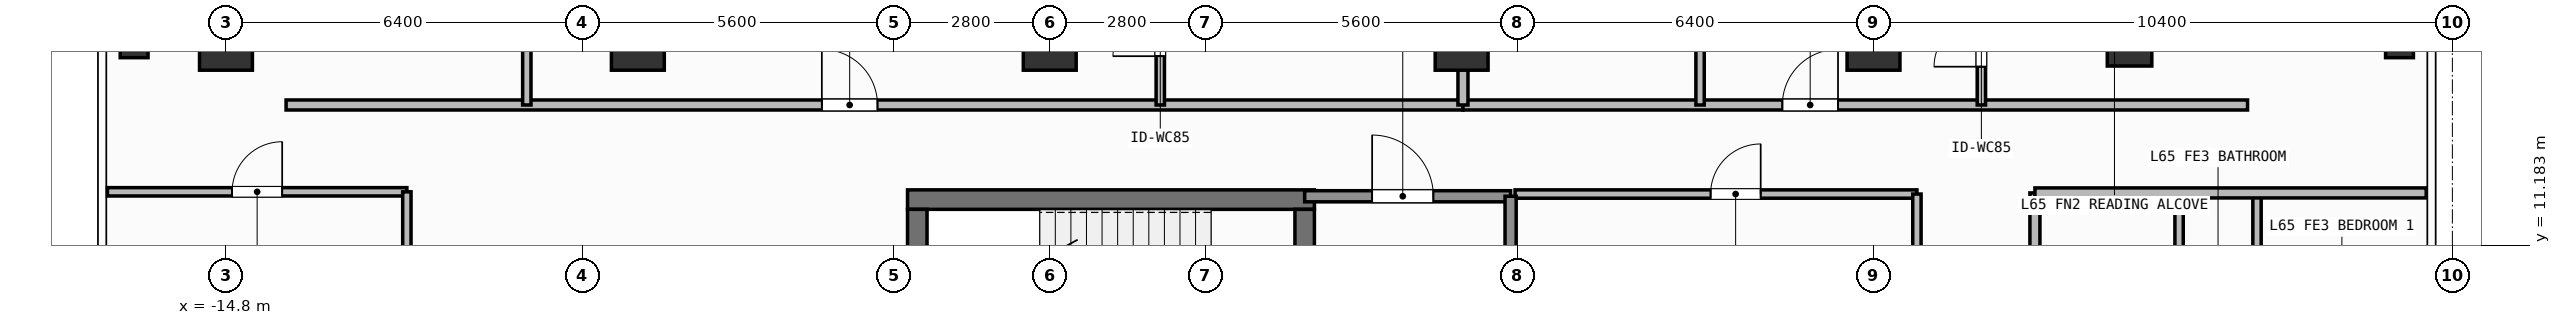
"""IFC4 building model, lengths in metres.
Left out: names, types, materials, properties, quantities, classifications, styles, units other than length and angle.
Written with IfcOpenShell. Run it as: python <this file> out.ifc"""

import sys

from ifc_helpers import new_model, si_unit, direction, frame, frame_2d, origin, origin_2d, place, context, subcontext, project, spatial, rectangle, hollow_rectangle, extrude, element, fill, save


model = new_model("IFC4")
c1 = context("Model", 3, precision=1e-05, world=origin(), true_north=direction((0.0, 1.0)))
c2 = subcontext(c1, "Body", "Model", "MODEL_VIEW")
j1 = project(units=[si_unit("LENGTHUNIT", "METRE"), si_unit("PLANEANGLEUNIT", "RADIAN")], contexts=[c1])
p1 = place(None, origin())
s1 = spatial("IfcSite", under=j1, at=p1, CompositionType="ELEMENT")
p2 = place(p1, origin())
s2 = spatial("IfcBuilding", under=s1, at=p2, CompositionType="ELEMENT")
p3 = place(p2, frame((0.0, 0.0, 266.4)))
s3 = spatial("IfcBuildingStorey", under=s2, at=p3, CompositionType="ELEMENT", Elevation=266.4)
p4 = place(p3, frame((-2.555, 12.0, 0.0), z_axis=(0.0, 0.0, 1.0), x_axis=(1.0, 0.0, 0.0)))
e1 = element("IfcWall", 1, at=p4, inside=s3, PredefinedType="SHEAR", context=c2, shape_type="SweptSolid", body=[
    extrude(rectangle(XDim=7.31, YDim=0.35, at=frame_2d((3.655, 0.0))), origin(), (0.0, 0.0, 1.0), 3.9),
])
p5 = place(p3, frame((-2.38, 8.9, 0.0), z_axis=(0.0, 0.0, 1.0), x_axis=(0.0, 1.0, 0.0)))
e2 = element("IfcWall", 2, at=p5, inside=s3, PredefinedType="SHEAR", context=c2, shape_type="SweptSolid", body=[
    extrude(rectangle(XDim=2.925, YDim=0.35, at=frame_2d((1.462, 0.0))), origin(), (0.0, 0.0, 1.0), 3.9),
])
p6 = place(p3, frame((4.58, 11.825, 0.0), z_axis=(0.0, 0.0, 1.0), x_axis=(0.0, -1.0, 0.0)))
e3 = element("IfcWall", 3, at=p6, inside=s3, PredefinedType="SHEAR", context=c2, shape_type="SweptSolid", body=[
    extrude(rectangle(XDim=2.925, YDim=0.35, at=frame_2d((1.462, 0.0))), origin(), (0.0, 0.0, 1.0), 3.9),
])
p7 = place(p6, frame((0.913, 0.0, 0.0)))
e4 = element("IfcOpeningElement", 4, at=p7, cuts=e3, PredefinedType="OPENING", context=c2, shape_type="SweptSolid", body=[
    extrude(rectangle(XDim=1.1, YDim=2.15, at=frame_2d((0.55, 1.075))), frame((0.0, 0.185, 0.0), z_axis=(0.0, -1.0, 0.0), x_axis=(1.0, 0.0, 0.0)), (0.0, 0.0, 1.0), 0.37),
])
for number, where, z_axis, x_axis in (
    (5, (-14.8, 14.8, 0.0), (0.0, 0.0, 1.0), (1.0, 0.0, 0.0)),
    (6, (-7.4, 14.8, 0.0), (0.0, 0.0, 1.0), (1.0, 0.0, 0.0)),
    (7, (0.0, 14.8, 0.0), (0.0, 0.0, 1.0), (1.0, 0.0, 0.0)),
    (8, (7.4, 14.8, 0.0), (0.0, 0.0, 1.0), (1.0, 0.0, 0.0)),
    (9, (14.8, 14.8, 0.0), (0.0, 0.0, 1.0), (1.0, 0.0, 0.0)),
):
    element("IfcColumn", number, at=place(p3, frame(where, z_axis=z_axis, x_axis=x_axis)), inside=s3, PredefinedType="COLUMN", context=c2, shape_type="SweptSolid", body=[
        extrude(rectangle(XDim=0.95, YDim=0.95, at=origin_2d()), origin(), (0.0, 0.0, 1.0), 3.9),
    ])
p8 = place(p3, frame((19.4, 14.8, 0.0), z_axis=(0.0, 0.0, 1.0), x_axis=(1.0, 0.0, 0.0)))
e10 = element("IfcColumn", 10, at=p8, inside=s3, PredefinedType="COLUMN", context=c2, shape_type="SweptSolid", body=[
    extrude(hollow_rectangle(XDim=0.8, YDim=0.8, WallThickness=0.036, at=origin_2d()), origin(), (0.0, 0.0, 1.0), 3.9),
])
for number, where, z_axis, x_axis in (
    (11, (-16.45, 14.8, 0.0), (0.0, 0.0, 1.0), (1.0, 0.0, 0.0)),
    (12, (24.25, 14.8, 0.0), (0.0, 0.0, 1.0), (1.0, 0.0, 0.0)),
):
    element("IfcColumn", number, at=place(p3, frame(where, z_axis=z_axis, x_axis=x_axis)), inside=s3, PredefinedType="COLUMN", context=c2, shape_type="SweptSolid", body=[
        extrude(hollow_rectangle(XDim=0.5, YDim=0.5, WallThickness=0.025, at=origin_2d()), origin(), (0.0, 0.0, 1.0), 3.9),
    ])
p9 = place(p3, frame((4.58, 12.06, 0.0), z_axis=(0.0, 0.0, 1.0), x_axis=(1.0, 0.0, 0.0)))
e13 = element("IfcWall", 13, at=p9, inside=s3, PredefinedType="SOLIDWALL", context=c2, shape_type="SweptSolid", body=[
    extrude(rectangle(XDim=3.7, YDim=0.2, at=frame_2d((1.85, 0.0))), origin(), (0.0, 0.0, 1.0), 3.68),
])
p10 = place(p9, frame((1.212, 0.0, 0.0)))
e14 = element("IfcOpeningElement", 14, at=p10, cuts=e13, PredefinedType="OPENING", context=c2, shape_type="SweptSolid", body=[
    extrude(rectangle(XDim=1.1, YDim=2.15, at=frame_2d((0.55, 1.075))), frame((0.0, 0.11, 0.0), z_axis=(0.0, -1.0, 0.0), x_axis=(1.0, 0.0, 0.0)), (0.0, 0.0, 1.0), 0.22),
])
p11 = place(p3, frame((8.36, 12.1, 0.0), z_axis=(0.0, 0.0, 1.0), x_axis=(1.0, 0.0, 0.0)))
e15 = element("IfcWall", 15, at=p11, inside=s3, PredefinedType="PARTITIONING", context=c2, shape_type="SweptSolid", body=[
    extrude(rectangle(XDim=7.22, YDim=0.15, at=frame_2d((3.61, 0.0))), origin(), (0.0, 0.0, 1.0), 3.68),
])
p12 = place(p11, frame((3.513, 0.0, 0.0)))
e16 = element("IfcOpeningElement", 16, at=p12, cuts=e15, PredefinedType="OPENING", context=c2, shape_type="SweptSolid", body=[
    extrude(rectangle(XDim=0.9, YDim=2.1, at=frame_2d((0.45, 1.05))), frame((0.0, 0.085, 0.0), z_axis=(0.0, -1.0, 0.0), x_axis=(1.0, 0.0, 0.0)), (0.0, 0.0, 1.0), 0.17),
])
p13 = place(p3, frame((-13.72, 13.7, 0.0), z_axis=(0.0, 0.0, 1.0), x_axis=(1.0, 0.0, 0.0)))
e17 = element("IfcWall", 17, at=p13, inside=s3, PredefinedType="PARTITIONING", context=c2, shape_type="SweptSolid", body=[
    extrude(rectangle(XDim=21.144, YDim=0.18, at=frame_2d((10.572, 0.0))), origin(), (0.0, 0.0, 1.0), 3.68),
])
p14 = place(p13, frame((9.625, 0.0, 0.0)))
e18 = element("IfcOpeningElement", 18, at=p14, cuts=e17, PredefinedType="OPENING", context=c2, shape_type="SweptSolid", body=[
    extrude(rectangle(XDim=1.0, YDim=2.2, at=frame_2d((0.5, 1.1))), frame((0.0, 0.1, 0.0), z_axis=(0.0, -1.0, 0.0), x_axis=(1.0, 0.0, 0.0)), (0.0, 0.0, 1.0), 0.2),
])
p15 = place(p3, frame((-9.395, 13.7, 0.0), z_axis=(0.0, 0.0, 1.0), x_axis=(0.0, 1.0, 0.0)))
e19 = element("IfcWall", 19, at=p15, inside=s3, PredefinedType="PARTITIONING", context=c2, shape_type="SweptSolid", body=[
    extrude(rectangle(XDim=4.213, YDim=0.15, at=frame_2d((2.106, 0.0))), origin(), (0.0, 0.0, 1.0), 3.68),
])
p16 = place(p15, frame((1.592, 0.0, 0.0)))
e20 = element("IfcOpeningElement", 20, at=p16, cuts=e19, PredefinedType="OPENING", context=c2, shape_type="SweptSolid", body=[
    extrude(rectangle(XDim=0.85, YDim=2.1, at=frame_2d((0.425, 1.05))), frame((0.0, 0.085, 0.0), z_axis=(0.0, -1.0, 0.0), x_axis=(1.0, 0.0, 0.0)), (0.0, 0.0, 1.0), 0.17),
])
p17 = place(p3, frame((1.986, 13.7, 0.0), z_axis=(0.0, 0.0, 1.0), x_axis=(0.0, 1.0, 0.0)))
e21 = element("IfcWall", 21, at=p17, inside=s3, PredefinedType="PARTITIONING", context=c2, shape_type="SweptSolid", body=[
    extrude(rectangle(XDim=2.604, YDim=0.15, at=frame_2d((1.302, 0.0))), origin(), (0.0, 0.0, 1.0), 3.68),
])
p18 = place(p17, frame((0.877, 0.0, 0.0)))
e22 = element("IfcOpeningElement", 22, at=p18, cuts=e21, PredefinedType="OPENING", context=c2, shape_type="SweptSolid", body=[
    extrude(rectangle(XDim=0.85, YDim=2.1, at=frame_2d((0.425, 1.05))), frame((0.0, 0.085, 0.0), z_axis=(0.0, -1.0, 0.0), x_axis=(1.0, 0.0, 0.0)), (0.0, 0.0, 1.0), 0.17),
])
p19 = place(p3, frame((7.424, 13.7, 0.0), z_axis=(0.0, 0.0, 1.0), x_axis=(1.0, 0.0, 0.0)))
e23 = element("IfcWall", 23, at=p19, inside=s3, PredefinedType="PARTITIONING", context=c2, shape_type="SweptSolid", body=[
    extrude(rectangle(XDim=14.096, YDim=0.18, at=frame_2d((7.048, 0.0))), origin(), (0.0, 0.0, 1.0), 3.68),
])
p20 = place(p19, frame((5.738, 0.0, 0.0)))
e24 = element("IfcOpeningElement", 24, at=p20, cuts=e23, PredefinedType="OPENING", context=c2, shape_type="SweptSolid", body=[
    extrude(rectangle(XDim=1.0, YDim=2.2, at=frame_2d((0.5, 1.1))), frame((0.0, 0.1, 0.0), z_axis=(0.0, -1.0, 0.0), x_axis=(1.0, 0.0, 0.0)), (0.0, 0.0, 1.0), 0.2),
])
p21 = place(p3, frame((11.684, 13.7, 0.0), z_axis=(0.0, 0.0, 1.0), x_axis=(0.0, 1.0, 0.0)))
e25 = element("IfcWall", 25, at=p21, inside=s3, PredefinedType="PARTITIONING", context=c2, shape_type="SweptSolid", body=[
    extrude(rectangle(XDim=4.29, YDim=0.15, at=frame_2d((2.145, 0.0))), origin(), (0.0, 0.0, 1.0), 3.68),
])
p22 = place(p21, frame((1.72, 0.0, 0.0)))
e26 = element("IfcOpeningElement", 26, at=p22, cuts=e25, PredefinedType="OPENING", context=c2, shape_type="SweptSolid", body=[
    extrude(rectangle(XDim=0.85, YDim=2.1, at=frame_2d((0.425, 1.05))), frame((0.0, 0.085, 0.0), z_axis=(0.0, -1.0, 0.0), x_axis=(1.0, 0.0, 0.0)), (0.0, 0.0, 1.0), 0.17),
])
p23 = place(p3, frame((16.738, 13.7, 0.0), z_axis=(0.0, 0.0, 1.0), x_axis=(0.0, 1.0, 0.0)))
e27 = element("IfcWall", 27, at=p23, inside=s3, PredefinedType="PARTITIONING", context=c2, shape_type="SweptSolid", body=[
    extrude(rectangle(XDim=2.402, YDim=0.15, at=frame_2d((1.201, 0.0))), origin(), (0.0, 0.0, 1.0), 3.68),
])
p24 = place(p23, frame((0.688, 0.0, 0.0)))
e28 = element("IfcOpeningElement", 28, at=p24, cuts=e27, PredefinedType="OPENING", context=c2, shape_type="SweptSolid", body=[
    extrude(rectangle(XDim=0.85, YDim=2.1, at=frame_2d((0.425, 1.05))), frame((0.0, 0.085, 0.0), z_axis=(0.0, -1.0, 0.0), x_axis=(1.0, 0.0, 0.0)), (0.0, 0.0, 1.0), 0.17),
])
p25 = place(p3, frame((-16.93, 12.14, 0.0), z_axis=(0.0, 0.0, 1.0), x_axis=(1.0, 0.0, 0.0)))
e29 = element("IfcWall", 29, at=p25, inside=s3, PredefinedType="PARTITIONING", context=c2, shape_type="SweptSolid", body=[
    extrude(rectangle(XDim=5.38, YDim=0.15, at=frame_2d((2.69, 0.0))), origin(), (0.0, 0.0, 1.0), 3.68),
])
p26 = place(p25, frame((2.24, 0.0, 0.0)))
e30 = element("IfcOpeningElement", 30, at=p26, cuts=e29, PredefinedType="OPENING", context=c2, shape_type="SweptSolid", body=[
    extrude(rectangle(XDim=0.9, YDim=2.1, at=frame_2d((0.45, 1.05))), frame((0.0, 0.085, 0.0), z_axis=(0.0, -1.0, 0.0), x_axis=(1.0, 0.0, 0.0)), (0.0, 0.0, 1.0), 0.17),
])
p27 = place(p3, frame((17.7, 4.04, 0.0), z_axis=(0.0, 0.0, 1.0), x_axis=(0.0, 1.0, 0.0)))
e31 = element("IfcWall", 31, at=p27, inside=s3, PredefinedType="PARTITIONING", context=c2, shape_type="SweptSolid", body=[
    extrude(rectangle(XDim=8.08, YDim=0.18, at=frame_2d((4.04, 0.0))), origin(), (0.0, 0.0, 1.0), 3.68),
])
p28 = place(p27, frame((1.761, 0.0, 0.0)))
e32 = element("IfcOpeningElement", 32, at=p28, cuts=e31, PredefinedType="OPENING", context=c2, shape_type="SweptSolid", body=[
    extrude(rectangle(XDim=1.0, YDim=2.2, at=frame_2d((0.5, 1.1))), frame((0.0, 0.1, 0.0), z_axis=(0.0, -1.0, 0.0), x_axis=(1.0, 0.0, 0.0)), (0.0, 0.0, 1.0), 0.2),
])
p29 = place(p3, frame((8.28, 8.725, 0.0), z_axis=(0.0, 0.0, 1.0), x_axis=(0.0, 1.0, 0.0)))
e33 = element("IfcWall", 33, at=p29, inside=s3, PredefinedType="SOLIDWALL", context=c2, shape_type="SweptSolid", body=[
    extrude(rectangle(XDim=3.335, YDim=0.2, at=frame_2d((1.667, 0.0))), origin(), (0.0, 0.0, 1.0), 3.68),
])
p30 = place(p3, frame((15.58, 5.85, 0.0), z_axis=(0.0, 0.0, 1.0), x_axis=(0.0, 1.0, 0.0)))
e34 = element("IfcWall", 34, at=p30, inside=s3, PredefinedType="PARTITIONING", context=c2, shape_type="SweptSolid", body=[
    extrude(rectangle(XDim=6.25, YDim=0.15, at=frame_2d((3.125, 0.0))), origin(), (0.0, 0.0, 1.0), 3.68),
])
p31 = place(p3, frame((7.424, 13.7, 0.0), z_axis=(0.0, 0.0, 1.0), x_axis=(0.0, 1.0, 0.0)))
e35 = element("IfcWall", 35, at=p31, inside=s3, PredefinedType="PARTITIONING", context=c2, shape_type="SweptSolid", body=[
    extrude(rectangle(XDim=7.33, YDim=0.18, at=frame_2d((3.665, 0.0))), origin(), (0.0, 0.0, 1.0), 3.182),
])
p32 = place(p3, frame((-11.55, 2.95, 0.0), z_axis=(0.0, 0.0, 1.0), x_axis=(0.0, 1.0, 0.0)))
e36 = element("IfcWall", 36, at=p32, inside=s3, PredefinedType="PARTITIONING", context=c2, shape_type="SweptSolid", body=[
    extrude(rectangle(XDim=9.19, YDim=0.15, at=frame_2d((4.595, 0.0))), origin(), (0.0, 0.0, 1.0), 3.68),
])
for number, where, z_axis, x_axis in (
    (37, (20.29, 8.505, 0.0), (0.0, 0.0, 1.0), (0.0, 1.0, 0.0)),
    (38, (21.69, 8.505, 0.0), (0.0, 0.0, 1.0), (0.0, 1.0, 0.0)),
):
    element("IfcWall", number, at=place(p3, frame(where, z_axis=z_axis, x_axis=x_axis)), inside=s3, PredefinedType="PARTITIONING", context=c2, shape_type="SweptSolid", body=[
        extrude(rectangle(XDim=3.615, YDim=0.15, at=frame_2d((1.808, 0.0))), origin(), (0.0, 0.0, 1.0), 3.68),
    ])
p33 = place(p3, frame((17.7, 12.12, 0.0), z_axis=(0.0, 0.0, 1.0), x_axis=(1.0, 0.0, 0.0)))
e39 = element("IfcWall", 39, at=p33, inside=s3, PredefinedType="PARTITIONING", context=c2, shape_type="SweptSolid", body=[
    extrude(rectangle(XDim=7.03, YDim=0.18, at=frame_2d((3.515, 0.0))), origin(), (0.0, 0.0, 1.0), 3.68),
])
p34 = place(p10, origin())
e40 = element("IfcDoor", 40, at=p34, inside=s3, OperationType="SINGLE_SWING_LEFT", PredefinedType="DOOR", context=c2, shape_type="SweptSolid", body=[
    extrude(rectangle(XDim=1.1, YDim=2.15, at=frame_2d((0.55, 1.075))), frame((0.0, 0.025, 0.0), z_axis=(0.0, -1.0, 0.0), x_axis=(1.0, 0.0, 0.0)), (0.0, 0.0, 1.0), 0.05),
])
fill(e14, e40)
p35 = place(p12, origin())
e41 = element("IfcDoor", 41, at=p35, inside=s3, OperationType="SINGLE_SWING_RIGHT", PredefinedType="DOOR", context=c2, shape_type="SweptSolid", body=[
    extrude(rectangle(XDim=0.9, YDim=2.1, at=frame_2d((0.45, 1.05))), frame((0.0, 0.025, 0.0), z_axis=(0.0, -1.0, 0.0), x_axis=(1.0, 0.0, 0.0)), (0.0, 0.0, 1.0), 0.05),
])
fill(e16, e41)
p36 = place(p14, origin())
e42 = element("IfcDoor", 42, at=p36, inside=s3, OperationType="SINGLE_SWING_LEFT", PredefinedType="DOOR", context=c2, shape_type="SweptSolid", body=[
    extrude(rectangle(XDim=1.0, YDim=2.2, at=frame_2d((0.5, 1.1))), frame((0.0, 0.025, 0.0), z_axis=(0.0, -1.0, 0.0), x_axis=(1.0, 0.0, 0.0)), (0.0, 0.0, 1.0), 0.05),
])
fill(e18, e42)
p37 = place(p18, origin())
e43 = element("IfcDoor", 43, at=p37, inside=s3, OperationType="SINGLE_SWING_LEFT", PredefinedType="DOOR", context=c2, shape_type="SweptSolid", body=[
    extrude(rectangle(XDim=0.85, YDim=2.1, at=frame_2d((0.425, 1.05))), frame((0.0, 0.025, 0.0), z_axis=(0.0, -1.0, 0.0), x_axis=(1.0, 0.0, 0.0)), (0.0, 0.0, 1.0), 0.05),
])
fill(e22, e43)
p38 = place(p20, origin())
e44 = element("IfcDoor", 44, at=p38, inside=s3, OperationType="SINGLE_SWING_RIGHT", PredefinedType="DOOR", context=c2, shape_type="SweptSolid", body=[
    extrude(rectangle(XDim=1.0, YDim=2.2, at=frame_2d((0.5, 1.1))), frame((0.0, 0.025, 0.0), z_axis=(0.0, -1.0, 0.0), x_axis=(1.0, 0.0, 0.0)), (0.0, 0.0, 1.0), 0.05),
])
fill(e24, e44)
p39 = place(p24, origin())
e45 = element("IfcDoor", 45, at=p39, inside=s3, OperationType="SINGLE_SWING_LEFT", PredefinedType="DOOR", context=c2, shape_type="SweptSolid", body=[
    extrude(rectangle(XDim=0.85, YDim=2.1, at=frame_2d((0.425, 1.05))), frame((0.0, 0.025, 0.0), z_axis=(0.0, -1.0, 0.0), x_axis=(1.0, 0.0, 0.0)), (0.0, 0.0, 1.0), 0.05),
])
fill(e28, e45)
p40 = place(p26, origin())
e46 = element("IfcDoor", 46, at=p40, inside=s3, OperationType="SINGLE_SWING_RIGHT", PredefinedType="DOOR", context=c2, shape_type="SweptSolid", body=[
    extrude(rectangle(XDim=0.9, YDim=2.1, at=frame_2d((0.45, 1.05))), frame((0.0, 0.025, 0.0), z_axis=(0.0, -1.0, 0.0), x_axis=(1.0, 0.0, 0.0)), (0.0, 0.0, 1.0), 0.05),
])
fill(e30, e46)
save(model, sys.argv[1])
